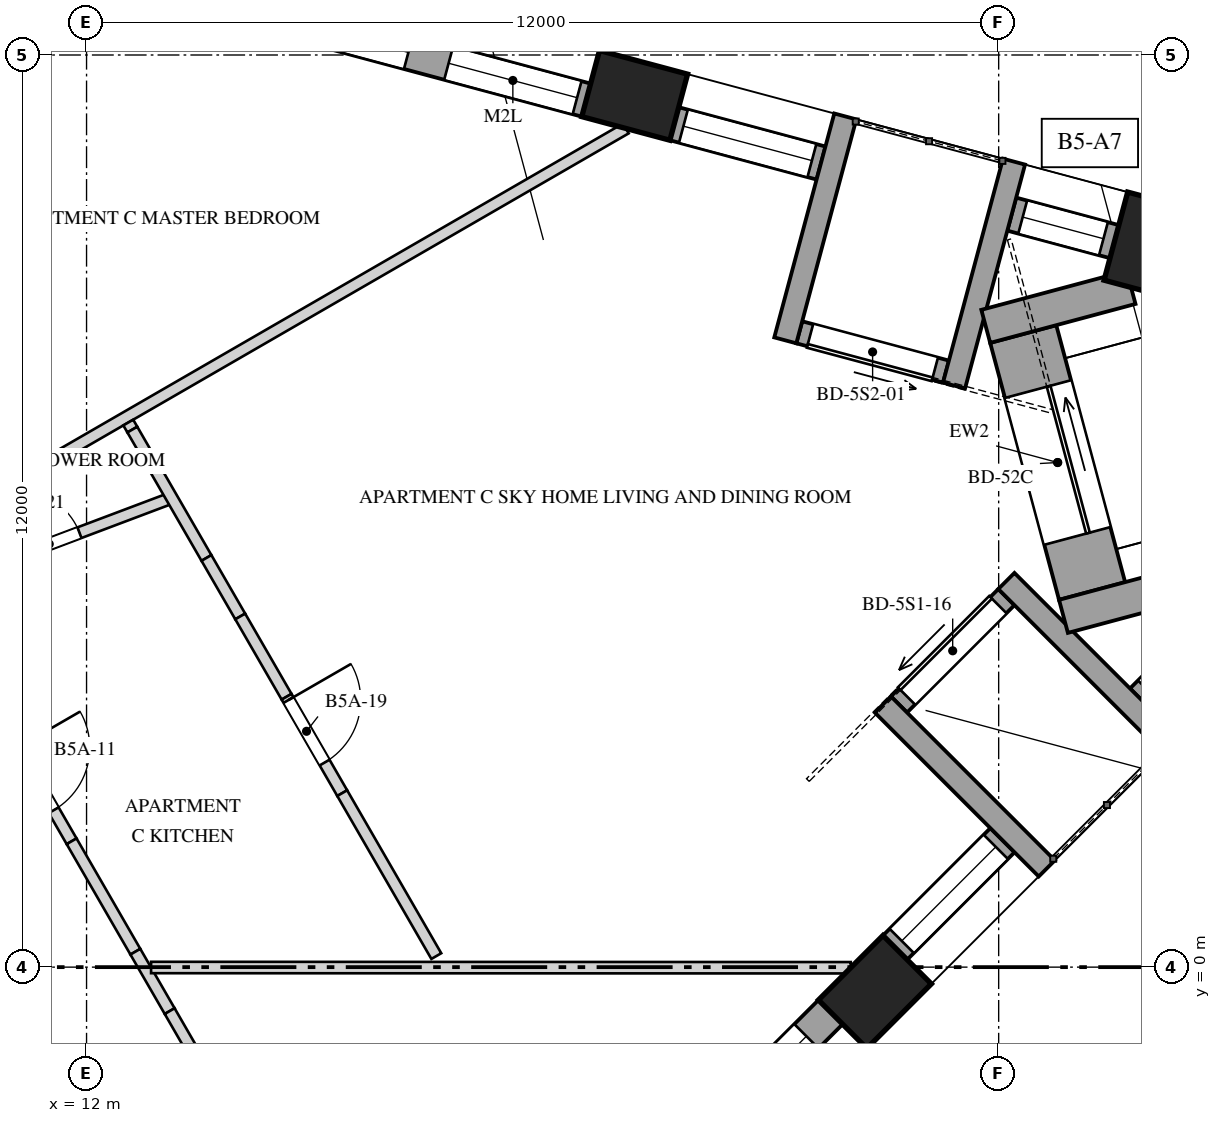
"""IFC4 building model, lengths in metres.
Left out: names, types, materials, properties, quantities, classifications, styles, units other than length and angle.
Written with IfcOpenShell. Run it as: python <this file> out.ifc"""

import sys

from ifc_helpers import new_model, si_unit, direction, frame, frame_2d, origin, origin_2d, place, context, subcontext, project, spatial, polyline, rectangle, outline, extrude, element, fill, save


model = new_model("IFC4")
c1 = context("Model", 3, precision=1e-05, world=origin(), true_north=direction((0.0, 1.0)))
c2 = subcontext(c1, "Body", "Model", "MODEL_VIEW")
j1 = project(units=[si_unit("LENGTHUNIT", "METRE"), si_unit("PLANEANGLEUNIT", "RADIAN")], contexts=[c1])
p1 = place(None, origin())
s1 = spatial("IfcSite", under=j1, at=p1, CompositionType="ELEMENT")
p2 = place(p1, origin())
s2 = spatial("IfcBuilding", under=s1, at=p2, CompositionType="ELEMENT")
p3 = place(p2, frame((0.0, 0.0, 200.0)))
s3 = spatial("IfcBuildingStorey", under=s2, at=p3, CompositionType="ELEMENT", Elevation=200.0)
p4 = place(p3, frame((22.372, -0.326, -0.35), z_axis=(0.0, 0.0, 1.0), x_axis=(0.707106781187, 0.707106781187, 0.0)))
e1 = element("IfcColumn", 1, at=p4, inside=s3, PredefinedType="COLUMN", context=c2, shape_type="SweptSolid", body=[
    extrude(rectangle(XDim=1.2, YDim=0.9, at=origin_2d()), origin(), (0.0, 0.0, 1.0), 4.35),
])
p5 = place(p3, frame((26.122, 9.462, -0.35), z_axis=(0.0, 0.0, 1.0), x_axis=(-0.965925826289, 0.258819045103, 0.0)))
e2 = element("IfcColumn", 2, at=p5, inside=s3, PredefinedType="COLUMN", context=c2, shape_type="SweptSolid", body=[
    extrude(rectangle(XDim=1.2, YDim=1.2, at=origin_2d()), origin(), (0.0, 0.0, 1.0), 4.35),
])
p6 = place(p3, frame((19.211, 11.469, -0.35), z_axis=(0.0, 0.0, 1.0), x_axis=(-0.965925826289, 0.258819045103, 0.0)))
e3 = element("IfcColumn", 3, at=p6, inside=s3, PredefinedType="COLUMN", context=c2, shape_type="SweptSolid", body=[
    extrude(rectangle(XDim=1.2, YDim=0.9, at=origin_2d()), origin(), (0.0, 0.0, 1.0), 4.35),
])
p7 = place(p3, frame((17.125, -5.254, 0.0), z_axis=(0.0, 0.0, 1.0), x_axis=(0.707106781187, 0.707106781187, 0.0)))
e4 = element("IfcWall", 4, at=p7, inside=s3, PredefinedType="SOLIDWALL", context=c2, shape_type="SweptSolid", body=[
    extrude(rectangle(XDim=6.594, YDim=0.45, at=frame_2d((3.297, 0.0))), origin(), (0.0, 0.0, 1.0), 3.3),
])
p8 = place(p7, frame((0.124, 0.0, 0.5)))
e5 = element("IfcOpeningElement", 5, at=p8, cuts=e4, PredefinedType="OPENING", context=c2, shape_type="SweptSolid", body=[
    extrude(rectangle(XDim=1.75, YDim=2.65, at=frame_2d((0.875, 1.325))), frame((0.0, 0.235, 0.0), z_axis=(0.0, -1.0, 0.0), x_axis=(1.0, 0.0, 0.0)), (0.0, 0.0, 1.0), 0.47),
])
p9 = place(p7, frame((2.422, 0.0, 0.5)))
e6 = element("IfcOpeningElement", 6, at=p9, cuts=e4, PredefinedType="OPENING", context=c2, shape_type="SweptSolid", body=[
    extrude(rectangle(XDim=1.75, YDim=2.65, at=frame_2d((0.875, 1.325))), frame((0.0, 0.235, 0.0), z_axis=(0.0, -1.0, 0.0), x_axis=(1.0, 0.0, 0.0)), (0.0, 0.0, 1.0), 0.47),
])
p10 = place(p7, frame((5.045, 0.0, 0.5)))
e7 = element("IfcOpeningElement", 7, at=p10, cuts=e4, PredefinedType="OPENING", context=c2, shape_type="SweptSolid", body=[
    extrude(rectangle(XDim=1.1, YDim=2.65, at=frame_2d((0.55, 1.325))), frame((0.0, 0.235, 0.0), z_axis=(0.0, -1.0, 0.0), x_axis=(1.0, 0.0, 0.0)), (0.0, 0.0, 1.0), 0.47),
])
p11 = place(p3, frame((22.637, 0.257, 0.0), z_axis=(0.0, 0.0, 1.0), x_axis=(0.707106781187, 0.707106781187, 0.0)))
e8 = element("IfcWall", 8, at=p11, inside=s3, PredefinedType="SOLIDWALL", context=c2, shape_type="SweptSolid", body=[
    extrude(rectangle(XDim=1.998, YDim=0.45, at=frame_2d((0.999, 0.0))), origin(), (0.0, 0.0, 1.0), 3.3),
])
p12 = place(p11, frame((0.124, 0.0, 0.5)))
e9 = element("IfcOpeningElement", 9, at=p12, cuts=e8, PredefinedType="OPENING", context=c2, shape_type="SweptSolid", body=[
    extrude(rectangle(XDim=1.75, YDim=2.65, at=frame_2d((0.875, 1.325))), frame((0.0, 0.235, 0.0), z_axis=(0.0, -1.0, 0.0), x_axis=(1.0, 0.0, 0.0)), (0.0, 0.0, 1.0), 0.47),
])
p13 = place(p3, frame((25.887, 3.507, 0.0), z_axis=(0.0, 0.0, 1.0), x_axis=(0.707106781187, 0.707106781187, 0.0)))
e10 = element("IfcWall", 10, at=p13, inside=s3, PredefinedType="SOLIDWALL", context=c2, shape_type="SweptSolid", body=[
    extrude(rectangle(XDim=1.398, YDim=0.45, at=frame_2d((0.699, 0.0))), origin(), (0.0, 0.0, 1.0), 3.3),
])
p14 = place(p13, frame((0.149, 0.0, 0.5)))
e11 = element("IfcOpeningElement", 11, at=p14, cuts=e10, PredefinedType="OPENING", context=c2, shape_type="SweptSolid", body=[
    extrude(rectangle(XDim=1.1, YDim=2.0, at=frame_2d((0.55, 1.0))), frame((0.0, 0.235, 0.0), z_axis=(0.0, -1.0, 0.0), x_axis=(1.0, 0.0, 0.0)), (0.0, 0.0, 1.0), 0.47),
])
p15 = place(p3, frame((25.523, 9.544, 0.0), z_axis=(0.0, 0.0, 1.0), x_axis=(-0.965938699585, 0.258770996527, 0.0)))
e12 = element("IfcWall", 12, at=p15, inside=s3, PredefinedType="SOLIDWALL", context=c2, shape_type="SweptSolid", body=[
    extrude(rectangle(XDim=1.398, YDim=0.45, at=frame_2d((0.699, 0.0))), origin(), (0.0, 0.0, 1.0), 3.3),
])
p16 = place(p15, frame((0.149, 0.0, 0.5)))
e13 = element("IfcOpeningElement", 13, at=p16, cuts=e12, PredefinedType="OPENING", context=c2, shape_type="SweptSolid", body=[
    extrude(rectangle(XDim=1.1, YDim=2.0, at=frame_2d((0.55, 1.0))), frame((0.0, 0.235, 0.0), z_axis=(0.0, -1.0, 0.0), x_axis=(1.0, 0.0, 0.0)), (0.0, 0.0, 1.0), 0.47),
])
p17 = place(p3, frame((21.663, 10.579, 0.0), z_axis=(0.0, 0.0, 1.0), x_axis=(-0.96593005298, 0.258803270362, 0.0)))
e14 = element("IfcWall", 14, at=p17, inside=s3, PredefinedType="SOLIDWALL", context=c2, shape_type="SweptSolid", body=[
    extrude(rectangle(XDim=1.998, YDim=0.45, at=frame_2d((0.999, 0.0))), origin(), (0.0, 0.0, 1.0), 3.3),
])
p18 = place(p17, frame((0.124, 0.0, 0.5)))
e15 = element("IfcOpeningElement", 15, at=p18, cuts=e14, PredefinedType="OPENING", context=c2, shape_type="SweptSolid", body=[
    extrude(rectangle(XDim=1.75, YDim=2.65, at=frame_2d((0.875, 1.325))), frame((0.0, 0.235, 0.0), z_axis=(0.0, -1.0, 0.0), x_axis=(1.0, 0.0, 0.0)), (0.0, 0.0, 1.0), 0.47),
])
p19 = place(p3, frame((18.573, 11.406, 0.0), z_axis=(0.0, 0.0, 1.0), x_axis=(-0.965921443251, 0.258835402268, 0.0)))
e16 = element("IfcWall", 16, at=p19, inside=s3, PredefinedType="SOLIDWALL", context=c2, shape_type="SweptSolid", body=[
    extrude(rectangle(XDim=6.594, YDim=0.45, at=frame_2d((3.297, 0.0))), origin(), (0.0, 0.0, 1.0), 3.3),
])
p20 = place(p19, frame((0.124, 0.0, 0.5)))
e17 = element("IfcOpeningElement", 17, at=p20, cuts=e16, PredefinedType="OPENING", context=c2, shape_type="SweptSolid", body=[
    extrude(rectangle(XDim=1.75, YDim=2.0, at=frame_2d((0.875, 1.0))), frame((0.0, 0.235, 0.0), z_axis=(0.0, -1.0, 0.0), x_axis=(1.0, 0.0, 0.0)), (0.0, 0.0, 1.0), 0.47),
])
p21 = place(p19, frame((2.422, 0.0, 0.5)))
e18 = element("IfcOpeningElement", 18, at=p21, cuts=e16, PredefinedType="OPENING", context=c2, shape_type="SweptSolid", body=[
    extrude(rectangle(XDim=1.75, YDim=2.65, at=frame_2d((0.875, 1.325))), frame((0.0, 0.235, 0.0), z_axis=(0.0, -1.0, 0.0), x_axis=(1.0, 0.0, 0.0)), (0.0, 0.0, 1.0), 0.47),
])
p22 = place(p19, frame((4.72, 0.0, 0.5)))
e19 = element("IfcOpeningElement", 19, at=p22, cuts=e16, PredefinedType="OPENING", context=c2, shape_type="SweptSolid", body=[
    extrude(rectangle(XDim=1.75, YDim=2.65, at=frame_2d((0.875, 1.325))), frame((0.0, 0.235, 0.0), z_axis=(0.0, -1.0, 0.0), x_axis=(1.0, 0.0, 0.0)), (0.0, 0.0, 1.0), 0.47),
])
p23 = place(p3, frame((22.689, 3.455, 0.0), z_axis=(0.0, 0.0, 1.0), x_axis=(0.707106781187, 0.707106781187, 0.0)))
e20 = element("IfcWall", 20, at=p23, inside=s3, PredefinedType="SOLIDWALL", context=c2, shape_type="SweptSolid", body=[
    extrude(rectangle(XDim=1.998, YDim=0.3, at=frame_2d((0.999, 0.0))), origin(), (0.0, 0.0, 1.0), 3.3),
])
p24 = place(p23, frame((0.149, 0.0, 0.0)))
e21 = element("IfcOpeningElement", 21, at=p24, cuts=e20, PredefinedType="OPENING", context=c2, shape_type="SweptSolid", body=[
    extrude(rectangle(XDim=1.7, YDim=2.45, at=frame_2d((0.85, 1.225))), frame((0.0, 0.16, 0.0), z_axis=(0.0, -1.0, 0.0), x_axis=(1.0, 0.0, 0.0)), (0.0, 0.0, 1.0), 0.32),
])
for number, where, z_axis, x_axis in (
    (22, (24.633, 1.299, 0.0), (0.0, 0.0, 1.0), (-0.707, 0.707, 0.0)),
    (23, (26.258, 2.924, 0.0), (0.0, 0.0, 1.0), (-0.707, 0.707, 0.0)),
):
    element("IfcWall", number, at=place(p3, frame(where, z_axis=z_axis, x_axis=x_axis)), inside=s3, PredefinedType="SOLIDWALL", context=c2, shape_type="SweptSolid", body=[
        extrude(rectangle(XDim=3.05, YDim=0.3, at=frame_2d((1.525, 0.0))), origin(), (0.0, 0.0, 1.0), 3.3),
    ])
p25 = place(p3, frame((23.307, 7.835, 0.0), z_axis=(0.0, 0.0, 1.0), x_axis=(-0.965938235865, 0.258772727493, 0.0)))
e24 = element("IfcWall", 24, at=p25, inside=s3, PredefinedType="SOLIDWALL", context=c2, shape_type="SweptSolid", body=[
    extrude(rectangle(XDim=1.998, YDim=0.3, at=frame_2d((0.999, 0.0))), origin(), (0.0, 0.0, 1.0), 3.3),
])
p26 = place(p25, frame((0.149, 0.0, 0.0)))
e25 = element("IfcOpeningElement", 25, at=p26, cuts=e24, PredefinedType="OPENING", context=c2, shape_type="SweptSolid", body=[
    extrude(rectangle(XDim=1.7, YDim=2.45, at=frame_2d((0.85, 1.225))), frame((0.0, 0.16, 0.0), z_axis=(0.0, -1.0, 0.0), x_axis=(1.0, 0.0, 0.0)), (0.0, 0.0, 1.0), 0.32),
])
for number, where, z_axis, x_axis in (
    (26, (24.202, 10.597, 0.0), (0.0, 0.0, 1.0), (-0.259, -0.966, 0.0)),
    (27, (21.982, 11.192, 0.0), (0.0, 0.0, 1.0), (-0.259, -0.966, 0.0)),
):
    element("IfcWall", number, at=place(p3, frame(where, z_axis=z_axis, x_axis=x_axis)), inside=s3, PredefinedType="SOLIDWALL", context=c2, shape_type="SweptSolid", body=[
        extrude(rectangle(XDim=3.05, YDim=0.3, at=frame_2d((1.525, 0.0))), origin(), (0.0, 0.0, 1.0), 3.3),
    ])
p27 = place(p3, frame((24.323, 8.329, 0.0), z_axis=(0.0, 0.0, 1.0), x_axis=(0.258847652622, -0.965918160473, 0.0)))
e28 = element("IfcWall", 28, at=p27, inside=s3, PredefinedType="SOLIDWALL", context=c2, shape_type="SweptSolid", body=[
    extrude(rectangle(XDim=3.5, YDim=0.9, at=frame_2d((1.75, 0.0))), origin(), (0.0, 0.0, 1.0), 3.3),
])
p28 = place(p27, frame((0.75, 0.0, 0.0)))
e29 = element("IfcOpeningElement", 29, at=p28, cuts=e28, PredefinedType="OPENING", context=c2, shape_type="SweptSolid", body=[
    extrude(rectangle(XDim=2.0, YDim=2.4, at=frame_2d((1.0, 1.2))), frame((0.0, 0.46, 0.0), z_axis=(0.0, -1.0, 0.0), x_axis=(1.0, 0.0, 0.0)), (0.0, 0.0, 1.0), 0.92),
])
p29 = place(p3, frame((25.742, 8.942, 0.0), z_axis=(0.0, 0.0, 1.0), x_axis=(-0.965935388955, -0.258783354109, 0.0)))
e30 = element("IfcWall", 30, at=p29, inside=s3, PredefinedType="SOLIDWALL", context=c2, shape_type="SweptSolid", body=[
    extrude(rectangle(XDim=1.979, YDim=0.45, at=frame_2d((0.99, 0.0))), origin(), (0.0, 0.0, 1.0), 2.55),
])
p30 = place(p3, frame((26.764, 5.127, 0.0), z_axis=(0.0, 0.0, 1.0), x_axis=(-0.965927127032, -0.258814190615, 0.0)))
e31 = element("IfcWall", 31, at=p30, inside=s3, PredefinedType="SOLIDWALL", context=c2, shape_type="SweptSolid", body=[
    extrude(rectangle(XDim=1.979, YDim=0.45, at=frame_2d((0.99, 0.0))), origin(), (0.0, 0.0, 1.0), 2.55),
])
p31 = place(p3, frame((11.067, 2.931, 0.0), z_axis=(0.0, 0.0, 1.0), x_axis=(0.500009564119, -0.866019881867, 0.0)))
e32 = element("IfcWall", 32, at=p31, inside=s3, PredefinedType="PARTITIONING", context=c2, shape_type="SweptSolid", body=[
    extrude(outline(polyline([(0.0, 0.0), (1.472, 0.0), (1.472, 2.55), (0.541, 2.55), (0.541, 3.65), (0.0, 3.65), (0.0, 0.0)])), frame((0.0, 0.075, 0.0), z_axis=(0.0, -1.0, 0.0), x_axis=(1.0, 0.0, 0.0)), (0.0, 0.0, 1.0), 0.15),
])
p32 = place(p31, frame((0.05, 0.0, 0.0)))
e33 = element("IfcOpeningElement", 33, at=p32, cuts=e32, PredefinedType="OPENING", context=c2, shape_type="SweptSolid", body=[
    extrude(rectangle(XDim=0.95, YDim=2.4, at=frame_2d((0.475, 1.2))), frame((0.0, 0.085, 0.0), z_axis=(0.0, -1.0, 0.0), x_axis=(1.0, 0.0, 0.0)), (0.0, 0.0, 1.0), 0.17),
])
p33 = place(p3, frame((11.803, 1.656, 0.0), z_axis=(0.0, 0.0, 1.0), x_axis=(0.499974444137, -0.866040157966, 0.0)))
e34 = element("IfcWall", 34, at=p33, inside=s3, PredefinedType="PARTITIONING", context=c2, shape_type="SweptSolid", body=[
    extrude(rectangle(XDim=1.677, YDim=0.15, at=frame_2d((0.839, 0.0))), origin(), (0.0, 0.0, 1.0), 3.65),
])
p34 = place(p3, frame((12.642, 0.203, 0.0), z_axis=(0.0, 0.0, 1.0), x_axis=(0.500065807255, -0.865987406614, 0.0)))
e35 = element("IfcWall", 35, at=p34, inside=s3, PredefinedType="PARTITIONING", context=c2, shape_type="SweptSolid", body=[
    extrude(rectangle(XDim=0.903, YDim=0.15, at=frame_2d((0.451, 0.0))), origin(), (0.0, 0.0, 1.0), 2.75),
])
p35 = place(p3, frame((13.094, -0.579, 0.0), z_axis=(0.0, 0.0, 1.0), x_axis=(0.499991648869, -0.866030225258, 0.0)))
e36 = element("IfcWall", 36, at=p35, inside=s3, PredefinedType="PARTITIONING", context=c2, shape_type="SweptSolid", body=[
    extrude(rectangle(XDim=4.239, YDim=0.15, at=frame_2d((2.12, 0.0))), origin(), (0.0, 0.0, 1.0), 3.65),
])
p36 = place(p3, frame((9.633, 5.566, 0.0), z_axis=(0.0, 0.0, 1.0), x_axis=(0.865840987412, 0.500319282576, 0.0)))
e37 = element("IfcWall", 37, at=p36, inside=s3, PredefinedType="PARTITIONING", context=c2, shape_type="SweptSolid", body=[
    extrude(rectangle(XDim=10.928, YDim=0.15, at=frame_2d((5.464, 0.0))), origin(), (0.0, 0.0, 1.0), 2.75),
])
p37 = place(p3, frame((9.899, 4.959, 0.0), z_axis=(0.0, 0.0, 1.0), x_axis=(0.935727228965, 0.352724471752, 0.0)))
e38 = element("IfcWall", 38, at=p37, inside=s3, PredefinedType="PARTITIONING", context=c2, shape_type="SweptSolid", body=[
    extrude(rectangle(XDim=3.441, YDim=0.15, at=frame_2d((1.721, 0.0))), origin(), (0.0, 0.0, 1.0), 3.65),
])
p38 = place(p37, frame((1.296, 0.0, 0.0)))
e39 = element("IfcOpeningElement", 39, at=p38, cuts=e38, PredefinedType="OPENING", context=c2, shape_type="SweptSolid", body=[
    extrude(rectangle(XDim=0.85, YDim=2.4, at=frame_2d((0.425, 1.2))), frame((0.0, 0.085, 0.0), z_axis=(0.0, -1.0, 0.0), x_axis=(1.0, 0.0, 0.0)), (0.0, 0.0, 1.0), 0.17),
])
p39 = place(p3, frame((12.549, 7.165, 0.0), z_axis=(0.0, 0.0, 1.0), x_axis=(0.501036270542, -0.865426285481, 0.0)))
e40 = element("IfcWall", 40, at=p39, inside=s3, PredefinedType="PARTITIONING", context=c2, shape_type="SweptSolid", body=[
    extrude(rectangle(XDim=0.107, YDim=0.15, at=frame_2d((0.054, 0.0))), origin(), (0.0, 0.0, 1.0), 2.75),
])
p40 = place(p3, frame((12.603, 7.072, 0.0), z_axis=(0.0, 0.0, 1.0), x_axis=(0.49995005938, -0.866054235095, 0.0)))
e41 = element("IfcWall", 41, at=p40, inside=s3, PredefinedType="PARTITIONING", context=c2, shape_type="SweptSolid", body=[
    extrude(rectangle(XDim=1.95, YDim=0.15, at=frame_2d((0.975, 0.0))), origin(), (0.0, 0.0, 1.0), 3.65),
])
p41 = place(p3, frame((13.577, 5.383, 0.0), z_axis=(0.0, 0.0, 1.0), x_axis=(0.499920601425, -0.866071239721, 0.0)))
e42 = element("IfcWall", 42, at=p41, inside=s3, PredefinedType="PARTITIONING", context=c2, shape_type="SweptSolid", body=[
    extrude(rectangle(XDim=0.889, YDim=0.15, at=frame_2d((0.444, 0.0))), origin(), (0.0, 0.0, 1.0), 2.55),
])
p42 = place(p3, frame((14.022, 4.614, 0.0), z_axis=(0.0, 0.0, 1.0), x_axis=(0.50005746179, -0.865992225662, 0.0)))
e43 = element("IfcWall", 43, at=p42, inside=s3, PredefinedType="PARTITIONING", context=c2, shape_type="SweptSolid", body=[
    extrude(rectangle(XDim=1.219, YDim=0.15, at=frame_2d((0.61, 0.0))), origin(), (0.0, 0.0, 1.0), 3.65),
])
p43 = place(p3, frame((14.632, 3.557, 0.0), z_axis=(0.0, 0.0, 1.0), x_axis=(0.50003034938, -0.866007880853, 0.0)))
e44 = element("IfcWall", 44, at=p43, inside=s3, PredefinedType="PARTITIONING", context=c2, shape_type="SweptSolid", body=[
    extrude(outline(polyline([(0.0, 0.0), (1.464, 0.0), (1.464, 2.55), (0.534, 2.55), (0.534, 3.65), (0.0, 3.65), (0.0, 0.0)])), frame((0.0, 0.075, 0.0), z_axis=(0.0, -1.0, 0.0), x_axis=(1.0, 0.0, 0.0)), (0.0, 0.0, 1.0), 0.15),
])
p44 = place(p43, frame((0.05, 0.0, 0.0)))
e45 = element("IfcOpeningElement", 45, at=p44, cuts=e44, PredefinedType="OPENING", context=c2, shape_type="SweptSolid", body=[
    extrude(rectangle(XDim=0.95, YDim=2.4, at=frame_2d((0.475, 1.2))), frame((0.0, 0.085, 0.0), z_axis=(0.0, -1.0, 0.0), x_axis=(1.0, 0.0, 0.0)), (0.0, 0.0, 1.0), 0.17),
])
p45 = place(p3, frame((15.364, 2.289, 0.0), z_axis=(0.0, 0.0, 1.0), x_axis=(0.499978546328, -0.866037789714, 0.0)))
e46 = element("IfcWall", 46, at=p45, inside=s3, PredefinedType="PARTITIONING", context=c2, shape_type="SweptSolid", body=[
    extrude(rectangle(XDim=2.476, YDim=0.15, at=frame_2d((1.238, 0.0))), origin(), (0.0, 0.0, 1.0), 3.65),
])
p46 = place(p3, frame((22.053, -0.008, 0.0), z_axis=(0.0, 0.0, 1.0), x_axis=(-0.999999931056, 0.00037133306, 0.0)))
e47 = element("IfcWall", 47, at=p46, inside=s3, PredefinedType="PARTITIONING", context=c2, shape_type="SweptSolid", body=[
    extrude(rectangle(XDim=9.205, YDim=0.15, at=frame_2d((4.602, 0.0))), origin(), (0.0, 0.0, 1.0), 2.75),
])
p47 = place(p3, frame((11.005, -0.561, 0.0), z_axis=(0.0, 0.0, 1.0), x_axis=(0.499993700073, -0.866029041019, 0.0)))
e48 = element("IfcWall", 48, at=p47, inside=s3, PredefinedType="SOLIDWALL", context=c2, shape_type="SweptSolid", body=[
    extrude(rectangle(XDim=4.155, YDim=0.2, at=frame_2d((2.078, 0.0))), origin(), (0.0, 0.0, 1.0), 3.65),
])
p48 = place(p10, origin())
e49 = element("IfcWindow", 49, at=p48, inside=s3, PartitioningType="SINGLE_PANEL", PredefinedType="WINDOW", context=c2, shape_type="SweptSolid", body=[
    extrude(rectangle(XDim=1.1, YDim=2.65, at=frame_2d((0.55, 1.325))), frame((0.0, 0.03, 0.0), z_axis=(0.0, -1.0, 0.0), x_axis=(1.0, 0.0, 0.0)), (0.0, 0.0, 1.0), 0.06),
])
fill(e7, e49)
p49 = place(p12, origin())
e50 = element("IfcWindow", 50, at=p49, inside=s3, PartitioningType="SINGLE_PANEL", PredefinedType="WINDOW", context=c2, shape_type="SweptSolid", body=[
    extrude(rectangle(XDim=1.75, YDim=2.65, at=frame_2d((0.875, 1.325))), frame((0.0, 0.03, 0.0), z_axis=(0.0, -1.0, 0.0), x_axis=(1.0, 0.0, 0.0)), (0.0, 0.0, 1.0), 0.06),
])
fill(e9, e50)
p50 = place(p16, origin())
e51 = element("IfcWindow", 51, at=p50, inside=s3, PartitioningType="SINGLE_PANEL", PredefinedType="WINDOW", context=c2, shape_type="SweptSolid", body=[
    extrude(rectangle(XDim=1.1, YDim=2.0, at=frame_2d((0.55, 1.0))), frame((0.0, 0.03, 0.0), z_axis=(0.0, -1.0, 0.0), x_axis=(1.0, 0.0, 0.0)), (0.0, 0.0, 1.0), 0.06),
])
fill(e13, e51)
p51 = place(p18, origin())
e52 = element("IfcWindow", 52, at=p51, inside=s3, PartitioningType="SINGLE_PANEL", PredefinedType="WINDOW", context=c2, shape_type="SweptSolid", body=[
    extrude(rectangle(XDim=1.75, YDim=2.65, at=frame_2d((0.875, 1.325))), frame((0.0, 0.03, 0.0), z_axis=(0.0, -1.0, 0.0), x_axis=(1.0, 0.0, 0.0)), (0.0, 0.0, 1.0), 0.06),
])
fill(e15, e52)
p52 = place(p20, origin())
e53 = element("IfcWindow", 53, at=p52, inside=s3, PartitioningType="SINGLE_PANEL", PredefinedType="WINDOW", context=c2, shape_type="SweptSolid", body=[
    extrude(rectangle(XDim=1.75, YDim=2.0, at=frame_2d((0.875, 1.0))), frame((0.0, 0.03, 0.0), z_axis=(0.0, -1.0, 0.0), x_axis=(1.0, 0.0, 0.0)), (0.0, 0.0, 1.0), 0.06),
])
fill(e17, e53)
p53 = place(p21, origin())
e54 = element("IfcWindow", 54, at=p53, inside=s3, PartitioningType="SINGLE_PANEL", PredefinedType="WINDOW", context=c2, shape_type="SweptSolid", body=[
    extrude(rectangle(XDim=1.75, YDim=2.65, at=frame_2d((0.875, 1.325))), frame((0.0, 0.03, 0.0), z_axis=(0.0, -1.0, 0.0), x_axis=(1.0, 0.0, 0.0)), (0.0, 0.0, 1.0), 0.06),
])
fill(e18, e54)
p54 = place(p24, origin())
e55 = element("IfcDoor", 55, at=p54, inside=s3, OperationType="SLIDING_TO_LEFT", PredefinedType="DOOR", context=c2, shape_type="SweptSolid", body=[
    extrude(rectangle(XDim=1.7, YDim=2.45, at=frame_2d((0.85, 1.225))), frame((0.0, 0.025, 0.0), z_axis=(0.0, -1.0, 0.0), x_axis=(1.0, 0.0, 0.0)), (0.0, 0.0, 1.0), 0.05),
])
fill(e21, e55)
p55 = place(p26, origin())
e56 = element("IfcDoor", 56, at=p55, inside=s3, OperationType="SLIDING_TO_LEFT", PredefinedType="DOOR", context=c2, shape_type="SweptSolid", body=[
    extrude(rectangle(XDim=1.7, YDim=2.45, at=frame_2d((0.85, 1.225))), frame((0.0, 0.025, 0.0), z_axis=(0.0, -1.0, 0.0), x_axis=(1.0, 0.0, 0.0)), (0.0, 0.0, 1.0), 0.05),
])
fill(e25, e56)
p56 = place(p28, origin())
e57 = element("IfcDoor", 57, at=p56, inside=s3, OperationType="SLIDING_TO_LEFT", PredefinedType="DOOR", context=c2, shape_type="SweptSolid", body=[
    extrude(rectangle(XDim=2.0, YDim=2.4, at=frame_2d((1.0, 1.2))), frame((0.0, 0.025, 0.0), z_axis=(0.0, -1.0, 0.0), x_axis=(1.0, 0.0, 0.0)), (0.0, 0.0, 1.0), 0.05),
])
fill(e29, e57)
p57 = place(p32, origin())
e58 = element("IfcDoor", 58, at=p57, inside=s3, OperationType="SINGLE_SWING_LEFT", PredefinedType="DOOR", context=c2, shape_type="SweptSolid", body=[
    extrude(rectangle(XDim=0.95, YDim=2.4, at=frame_2d((0.475, 1.2))), frame((0.0, 0.025, 0.0), z_axis=(0.0, -1.0, 0.0), x_axis=(1.0, 0.0, 0.0)), (0.0, 0.0, 1.0), 0.05),
])
fill(e33, e58)
p58 = place(p44, origin())
e59 = element("IfcDoor", 59, at=p58, inside=s3, OperationType="SINGLE_SWING_LEFT", PredefinedType="DOOR", context=c2, shape_type="SweptSolid", body=[
    extrude(rectangle(XDim=0.95, YDim=2.4, at=frame_2d((0.475, 1.2))), frame((0.0, 0.025, 0.0), z_axis=(0.0, -1.0, 0.0), x_axis=(1.0, 0.0, 0.0)), (0.0, 0.0, 1.0), 0.05),
])
fill(e45, e59)
p59 = place(p38, origin())
e60 = element("IfcDoor", 60, at=p59, inside=s3, OperationType="SINGLE_SWING_LEFT", PredefinedType="DOOR", context=c2, shape_type="SweptSolid", body=[
    extrude(rectangle(XDim=0.85, YDim=2.4, at=frame_2d((0.425, 1.2))), frame((0.0, 0.025, 0.0), z_axis=(0.0, -1.0, 0.0), x_axis=(1.0, 0.0, 0.0)), (0.0, 0.0, 1.0), 0.05),
])
fill(e39, e60)
save(model, sys.argv[1])
